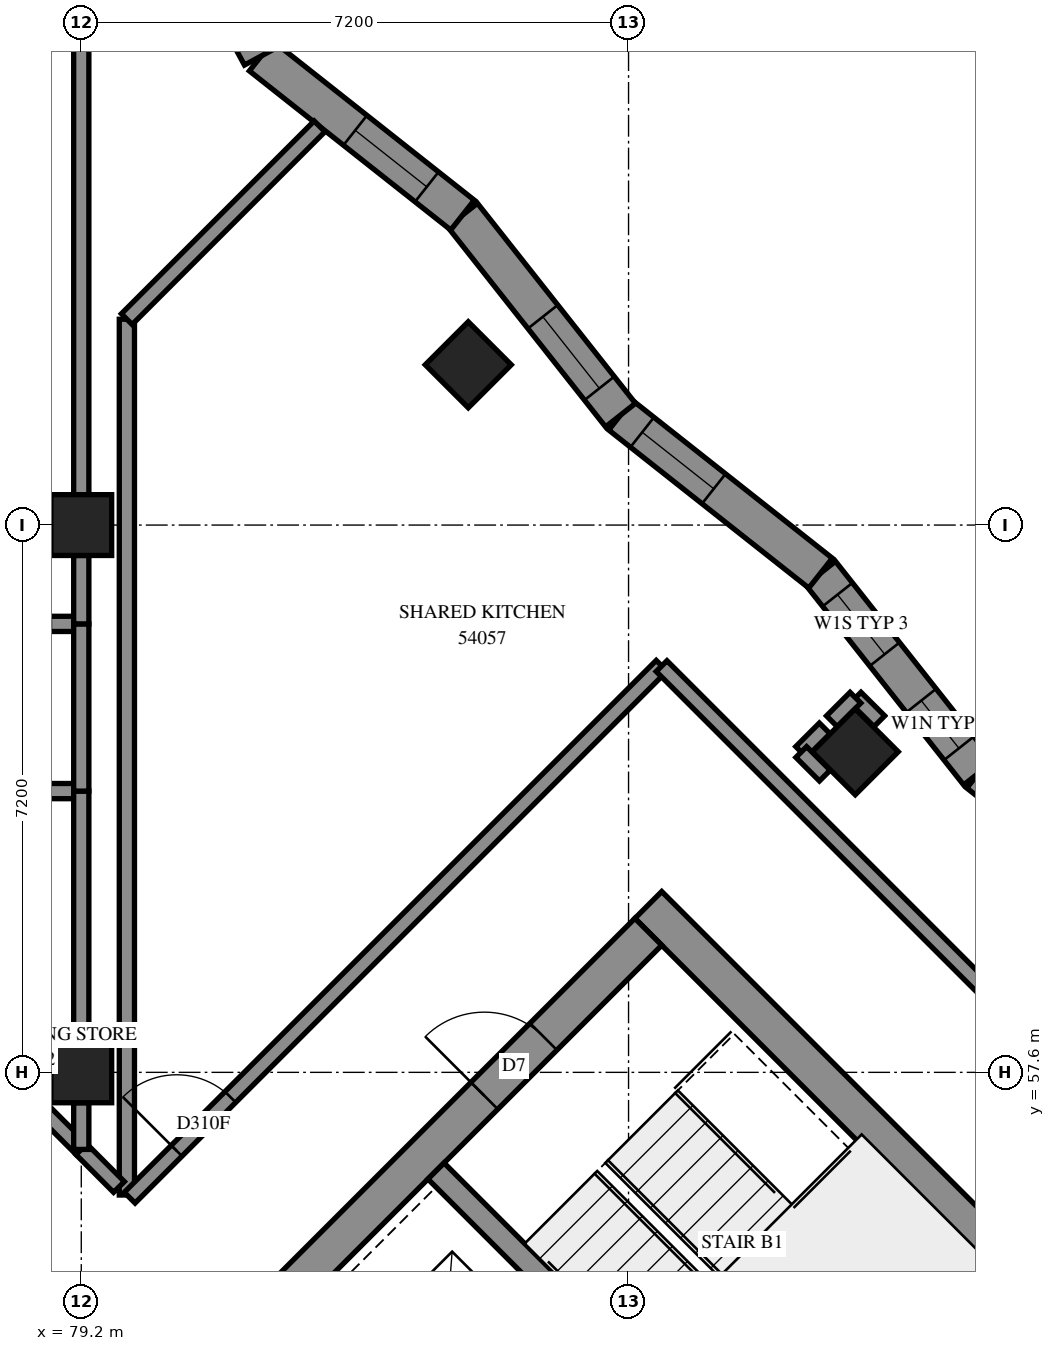
"""IFC4 building model, lengths in metres.
Left out: names, types, materials, properties, quantities, classifications, styles, units other than length and angle.
Written with IfcOpenShell. Run it as: python <this file> out.ifc"""

import sys

from ifc_helpers import new_model, si_unit, direction, frame, frame_2d, origin, origin_2d, place, context, subcontext, project, spatial, polyline, rectangle, outline, extrude, element, fill, save


model = new_model("IFC4")
c1 = context("Model", 3, precision=1e-05, world=origin(), true_north=direction((0.0, 1.0)))
c2 = subcontext(c1, "Body", "Model", "MODEL_VIEW")
j1 = project(units=[si_unit("LENGTHUNIT", "METRE"), si_unit("PLANEANGLEUNIT", "RADIAN")], contexts=[c1])
p1 = place(None, origin())
s1 = spatial("IfcSite", under=j1, at=p1, CompositionType="ELEMENT")
p2 = place(p1, origin())
s2 = spatial("IfcBuilding", under=s1, at=p2, CompositionType="ELEMENT")
p3 = place(p2, frame((0.0, 0.0, 199.8)))
s3 = spatial("IfcBuildingStorey", under=s2, at=p3, CompositionType="ELEMENT", Elevation=199.8)
for number, where, z_axis, x_axis in (
    (1, (79.2, 57.6, 0.0), (0.0, 0.0, 1.0), (1.0, 0.0, 0.0)),
    (2, (79.2, 64.8, 0.0), (0.0, 0.0, 1.0), (1.0, 0.0, 0.0)),
    (3, (84.291, 66.909, 0.0), (0.0, 0.0, 1.0), (0.707, -0.707, 0.0)),
    (4, (89.382, 61.818, 0.0), (0.0, 0.0, 1.0), (0.707, -0.707, 0.0)),
):
    element("IfcColumn", number, at=place(p3, frame(where, z_axis=z_axis, x_axis=x_axis)), inside=s3, PredefinedType="COLUMN", context=c2, shape_type="SweptSolid", body=[
        extrude(rectangle(XDim=0.8, YDim=0.8, at=origin_2d()), origin(), (0.0, 0.0, 1.0), 3.1),
    ])
p4 = place(p3, frame((86.66, 59.802, -0.3), z_axis=(0.0, 0.0, 1.0), x_axis=(0.7071067812, -0.7071067812, 0.0)))
e5 = element("IfcWall", 5, at=p4, inside=s3, PredefinedType="SHEAR", context=c2, shape_type="SweptSolid", body=[
    extrude(rectangle(XDim=15.4, YDim=0.5, at=frame_2d((7.7, 0.0))), origin(), (0.0, 0.0, 1.0), 2.7),
])
p5 = place(p4, frame((10.5, 0.0, 0.3)))
e6 = element("IfcOpeningElement", 6, at=p5, cuts=e5, PredefinedType="OPENING", context=c2, shape_type="SweptSolid", body=[
    extrude(rectangle(XDim=0.8, YDim=2.1, at=frame_2d((0.4, 1.05))), frame((0.0, 0.26, 0.0), z_axis=(0.0, -1.0, 0.0), x_axis=(1.0, 0.0, 0.0)), (0.0, 0.0, 1.0), 0.52),
])
p6 = place(p3, frame((76.478, 49.267, -0.3), z_axis=(0.0, 0.0, 1.0), x_axis=(0.7071067812, 0.7071067812, 0.0)))
e7 = element("IfcWall", 7, at=p6, inside=s3, PredefinedType="SHEAR", context=c2, shape_type="SweptSolid", body=[
    extrude(rectangle(XDim=14.4, YDim=0.5, at=frame_2d((7.2, 0.0))), origin(), (0.0, 0.0, 1.0), 2.7),
])
p7 = place(p6, frame((4.55, 0.0, 0.3)))
e8 = element("IfcOpeningElement", 8, at=p7, cuts=e7, PredefinedType="OPENING", context=c2, shape_type="SweptSolid", body=[
    extrude(rectangle(XDim=1.1, YDim=2.1, at=frame_2d((0.55, 1.05))), frame((0.0, 0.26, 0.0), z_axis=(0.0, -1.0, 0.0), x_axis=(1.0, 0.0, 0.0)), (0.0, 0.0, 1.0), 0.52),
])
p8 = place(p6, frame((11.35, 0.0, 0.3)))
e9 = element("IfcOpeningElement", 9, at=p8, cuts=e7, PredefinedType="OPENING", context=c2, shape_type="SweptSolid", body=[
    extrude(rectangle(XDim=1.1, YDim=2.1, at=frame_2d((0.55, 1.05))), frame((0.0, 0.26, 0.0), z_axis=(0.0, -1.0, 0.0), x_axis=(1.0, 0.0, 0.0)), (0.0, 0.0, 1.0), 0.52),
])
p9 = place(p3, frame((83.867, 56.302, 0.0), z_axis=(0.0, 0.0, 1.0), x_axis=(0.7071137256, -0.7070998367, 0.0)))
e10 = element("IfcWall", 10, at=p9, inside=s3, PredefinedType="SOLIDWALL", context=c2, shape_type="SweptSolid", body=[
    extrude(rectangle(XDim=7.2, YDim=0.3, at=frame_2d((3.6, 0.0))), origin(), (0.0, 0.0, 1.0), 3.1),
])
p10 = place(p3, frame((93.636, 59.458, 0.0), z_axis=(0.0, 0.0, 1.0), x_axis=(-0.7847316147, 0.6198356984, 0.0)))
e11 = element("IfcWall", 11, at=p10, inside=s3, PredefinedType="SOLIDWALL", context=c2, shape_type="SweptSolid", body=[
    extrude(outline(polyline([(-0.029, -0.25), (3.324, -0.25), (3.383, 0.25), (0.029, 0.25), (-0.029, -0.25)])), origin(), (0.0, 0.0, 1.0), 3.1),
])
p11 = place(p10, frame((1.519, 0.0, 0.45)))
e12 = element("IfcOpeningElement", 12, at=p11, cuts=e11, PredefinedType="OPENING", context=c2, shape_type="SweptSolid", body=[
    extrude(rectangle(XDim=1.2, YDim=2.5, at=frame_2d((0.6, 1.25))), frame((0.0, 0.26, 0.0), z_axis=(0.0, -1.0, 0.0), x_axis=(1.0, 0.0, 0.0)), (0.0, 0.0, 1.0), 0.52),
])
p12 = place(p3, frame((91.005, 61.536, 0.0), z_axis=(0.0, 0.0, 1.0), x_axis=(-0.6198356984, 0.7847316147, 0.0)))
e13 = element("IfcWall", 13, at=p12, inside=s3, PredefinedType="SOLIDWALL", context=c2, shape_type="SweptSolid", body=[
    extrude(outline(polyline([(0.029, -0.25), (3.383, -0.25), (3.324, 0.25), (-0.029, 0.25), (0.029, -0.25)])), origin(), (0.0, 0.0, 1.0), 3.1),
])
p13 = place(p12, frame((0.416, 0.0, 0.45)))
e14 = element("IfcOpeningElement", 14, at=p13, cuts=e13, PredefinedType="OPENING", context=c2, shape_type="SweptSolid", body=[
    extrude(rectangle(XDim=0.8, YDim=2.5, at=frame_2d((0.4, 1.25))), frame((0.0, 0.26, 0.0), z_axis=(0.0, -1.0, 0.0), x_axis=(1.0, 0.0, 0.0)), (0.0, 0.0, 1.0), 0.52),
])
p14 = place(p12, frame((1.993, 0.0, 0.45)))
e15 = element("IfcOpeningElement", 15, at=p14, cuts=e13, PredefinedType="OPENING", context=c2, shape_type="SweptSolid", body=[
    extrude(rectangle(XDim=1.0, YDim=2.5, at=frame_2d((0.5, 1.25))), frame((0.0, 0.26, 0.0), z_axis=(0.0, -1.0, 0.0), x_axis=(1.0, 0.0, 0.0)), (0.0, 0.0, 1.0), 0.52),
])
p15 = place(p3, frame((88.926, 64.168, 0.0), z_axis=(0.0, 0.0, 1.0), x_axis=(-0.7847316147, 0.6198356984, 0.0)))
e16 = element("IfcWall", 16, at=p15, inside=s3, PredefinedType="SOLIDWALL", context=c2, shape_type="SweptSolid", body=[
    extrude(outline(polyline([(-0.029, -0.25), (3.324, -0.25), (3.383, 0.25), (0.029, 0.25), (-0.029, -0.25)])), origin(), (0.0, 0.0, 1.0), 3.1),
])
p16 = place(p15, frame((1.79, 0.0, 0.45)))
e17 = element("IfcOpeningElement", 17, at=p16, cuts=e16, PredefinedType="OPENING", context=c2, shape_type="SweptSolid", body=[
    extrude(rectangle(XDim=1.2, YDim=2.5, at=frame_2d((0.6, 1.25))), frame((0.0, 0.26, 0.0), z_axis=(0.0, -1.0, 0.0), x_axis=(1.0, 0.0, 0.0)), (0.0, 0.0, 1.0), 0.52),
])
p17 = place(p3, frame((86.294, 66.247, 0.0), z_axis=(0.0, 0.0, 1.0), x_axis=(-0.6198356984, 0.7847316147, 0.0)))
e18 = element("IfcWall", 18, at=p17, inside=s3, PredefinedType="SOLIDWALL", context=c2, shape_type="SweptSolid", body=[
    extrude(outline(polyline([(0.029, -0.25), (3.383, -0.25), (3.324, 0.25), (-0.029, 0.25), (0.029, -0.25)])), origin(), (0.0, 0.0, 1.0), 3.1),
])
p18 = place(p17, frame((0.449, 0.0, 0.45)))
e19 = element("IfcOpeningElement", 19, at=p18, cuts=e18, PredefinedType="OPENING", context=c2, shape_type="SweptSolid", body=[
    extrude(rectangle(XDim=1.2, YDim=2.5, at=frame_2d((0.6, 1.25))), frame((0.0, 0.26, 0.0), z_axis=(0.0, -1.0, 0.0), x_axis=(1.0, 0.0, 0.0)), (0.0, 0.0, 1.0), 0.52),
])
p19 = place(p3, frame((84.216, 68.878, 0.0), z_axis=(0.0, 0.0, 1.0), x_axis=(-0.7847265348, 0.6198421296, 0.0)))
e20 = element("IfcWall", 20, at=p19, inside=s3, PredefinedType="SOLIDWALL", context=c2, shape_type="SweptSolid", body=[
    extrude(outline(polyline([(-0.029, -0.25), (3.324, -0.25), (3.427, 0.25), (0.029, 0.25), (-0.029, -0.25)])), origin(), (0.0, 0.0, 1.0), 3.1),
])
p20 = place(p19, frame((0.599, 0.0, 0.45)))
e21 = element("IfcOpeningElement", 21, at=p20, cuts=e20, PredefinedType="OPENING", context=c2, shape_type="SweptSolid", body=[
    extrude(rectangle(XDim=1.2, YDim=2.5, at=frame_2d((0.6, 1.25))), frame((0.0, 0.26, 0.0), z_axis=(0.0, -1.0, 0.0), x_axis=(1.0, 0.0, 0.0)), (0.0, 0.0, 1.0), 0.52),
])
p21 = place(p3, frame((81.567, 70.971, 0.0), z_axis=(0.0, 0.0, 1.0), x_axis=(-0.476089682, 0.8793967334, 0.0)))
e22 = element("IfcWall", 22, at=p21, inside=s3, PredefinedType="SOLIDWALL", context=c2, shape_type="SweptSolid", body=[
    extrude(outline(polyline([(0.051, -0.25), (3.526, -0.25), (3.134, 0.25), (-0.051, 0.25), (0.051, -0.25)])), origin(), (0.0, 0.0, 1.0), 3.1),
])
p22 = place(p21, frame((0.753, 0.0, 0.45)))
e23 = element("IfcOpeningElement", 23, at=p22, cuts=e22, PredefinedType="OPENING", context=c2, shape_type="SweptSolid", body=[
    extrude(rectangle(XDim=1.2, YDim=2.5, at=frame_2d((0.6, 1.25))), frame((0.0, 0.26, 0.0), z_axis=(0.0, -1.0, 0.0), x_axis=(1.0, 0.0, 0.0)), (0.0, 0.0, 1.0), 0.52),
])
p23 = place(p3, frame((79.8, 55.986, 0.0), z_axis=(0.0, 0.0, 1.0), x_axis=(0.0, 1.0, 0.0)))
e24 = element("IfcWall", 24, at=p23, inside=s3, PredefinedType="PARTITIONING", context=c2, shape_type="SweptSolid", body=[
    extrude(rectangle(XDim=11.522, YDim=0.2, at=frame_2d((5.761, 0.0))), origin(), (0.0, 0.0, 1.0), 3.1),
])
p24 = place(p3, frame((79.837, 55.951, 0.0), z_axis=(0.0, 0.0, 1.0), x_axis=(0.7071067812, 0.7071067812, 0.0)))
e25 = element("IfcWall", 25, at=p24, inside=s3, PredefinedType="PARTITIONING", context=c2, shape_type="SweptSolid", body=[
    extrude(rectangle(XDim=9.897, YDim=0.2, at=frame_2d((4.948, 0.0))), origin(), (0.0, 0.0, 1.0), 3.1),
])
p25 = place(p24, frame((0.873, 0.0, 0.0)))
e26 = element("IfcOpeningElement", 26, at=p25, cuts=e25, PredefinedType="OPENING", context=c2, shape_type="SweptSolid", body=[
    extrude(rectangle(XDim=1.0, YDim=2.1, at=frame_2d((0.5, 1.05))), frame((0.0, 0.11, 0.0), z_axis=(0.0, -1.0, 0.0), x_axis=(1.0, 0.0, 0.0)), (0.0, 0.0, 1.0), 0.22),
])
p26 = place(p3, frame((86.835, 62.945, 0.0), z_axis=(0.0, 0.0, 1.0), x_axis=(0.7071067812, -0.7071067812, 0.0)))
e27 = element("IfcWall", 27, at=p26, inside=s3, PredefinedType="PARTITIONING", context=c2, shape_type="SweptSolid", body=[
    extrude(rectangle(XDim=9.798, YDim=0.2, at=frame_2d((4.899, 0.0))), origin(), (0.0, 0.0, 1.0), 3.1),
])
p27 = place(p3, frame((74.489, 61.303, 0.0), z_axis=(0.0, 0.0, 1.0), x_axis=(0.7071892763, -0.7070242765, 0.0)))
e28 = element("IfcWall", 28, at=p27, inside=s3, PredefinedType="PARTITIONING", context=c2, shape_type="SweptSolid", body=[
    extrude(rectangle(XDim=6.667, YDim=0.2, at=frame_2d((3.333, 0.0))), origin(), (0.0, 0.0, 1.0), 3.1),
])
p28 = place(p3, frame((79.2, 65.2, 0.0), z_axis=(0.0, 0.0, 1.0), x_axis=(0.0, 1.0, 0.0)))
e29 = element("IfcWall", 29, at=p28, inside=s3, PredefinedType="PARTITIONING", context=c2, shape_type="SweptSolid", body=[
    extrude(rectangle(XDim=6.4, YDim=0.2, at=frame_2d((3.2, 0.0))), origin(), (0.0, 0.0, 1.0), 3.1),
])
p29 = place(p3, frame((74.489, 61.303, 0.0), z_axis=(0.0, 0.0, 1.0), x_axis=(0.9999998105, -0.0006155543, 0.0)))
e30 = element("IfcWall", 30, at=p29, inside=s3, PredefinedType="PARTITIONING", context=c2, shape_type="SweptSolid", body=[
    extrude(rectangle(XDim=4.711, YDim=0.2, at=frame_2d((2.356, 0.0))), origin(), (0.0, 0.0, 1.0), 3.1),
])
p30 = place(p29, frame((1.037, 0.0, 0.0)))
e31 = element("IfcOpeningElement", 31, at=p30, cuts=e30, PredefinedType="OPENING", context=c2, shape_type="SweptSolid", body=[
    extrude(rectangle(XDim=1.0, YDim=2.1, at=frame_2d((0.5, 1.05))), frame((0.0, 0.11, 0.0), z_axis=(0.0, -1.0, 0.0), x_axis=(1.0, 0.0, 0.0)), (0.0, 0.0, 1.0), 0.22),
])
p31 = place(p3, frame((74.602, 63.5, 0.0), z_axis=(0.0, 0.0, 1.0), x_axis=(1.0, 0.0, 0.0)))
e32 = element("IfcWall", 32, at=p31, inside=s3, PredefinedType="PARTITIONING", context=c2, shape_type="SweptSolid", body=[
    extrude(rectangle(XDim=4.598, YDim=0.2, at=frame_2d((2.299, 0.0))), origin(), (0.0, 0.0, 1.0), 3.1),
])
p32 = place(p31, frame((3.298, 0.0, 0.0)))
e33 = element("IfcOpeningElement", 33, at=p32, cuts=e32, PredefinedType="OPENING", context=c2, shape_type="SweptSolid", body=[
    extrude(rectangle(XDim=0.9, YDim=2.1, at=frame_2d((0.45, 1.05))), frame((0.0, 0.11, 0.0), z_axis=(0.0, -1.0, 0.0), x_axis=(1.0, 0.0, 0.0)), (0.0, 0.0, 1.0), 0.22),
])
p33 = place(p3, frame((79.799, 67.509, 0.0), z_axis=(0.0, 0.0, 1.0), x_axis=(0.7070928405, 0.7071207216, 0.0)))
e34 = element("IfcWall", 34, at=p33, inside=s3, PredefinedType="PARTITIONING", context=c2, shape_type="SweptSolid", body=[
    extrude(rectangle(XDim=3.587, YDim=0.2, at=frame_2d((1.793, 0.0))), origin(), (0.0, 0.0, 1.0), 3.1),
])
p34 = place(p3, frame((79.2, 58.0, 0.0), z_axis=(0.0, 0.0, 1.0), x_axis=(0.0, 1.0, 0.0)))
e35 = element("IfcWall", 35, at=p34, inside=s3, PredefinedType="PARTITIONING", context=c2, shape_type="SweptSolid", body=[
    extrude(rectangle(XDim=3.3, YDim=0.2, at=frame_2d((1.65, 0.0))), origin(), (0.0, 0.0, 1.0), 3.1),
])
p35 = place(p3, frame((79.2, 61.3, 0.0), z_axis=(0.0, 0.0, 1.0), x_axis=(0.0, 1.0, 0.0)))
e36 = element("IfcWall", 36, at=p35, inside=s3, PredefinedType="PARTITIONING", context=c2, shape_type="SweptSolid", body=[
    extrude(rectangle(XDim=2.2, YDim=0.2, at=frame_2d((1.1, 0.0))), origin(), (0.0, 0.0, 1.0), 3.1),
])
p36 = place(p3, frame((79.2, 63.5, 0.0), z_axis=(0.0, 0.0, 1.0), x_axis=(0.0, 1.0, 0.0)))
e37 = element("IfcWall", 37, at=p36, inside=s3, PredefinedType="PARTITIONING", context=c2, shape_type="SweptSolid", body=[
    extrude(rectangle(XDim=0.9, YDim=0.2, at=frame_2d((0.45, 0.0))), origin(), (0.0, 0.0, 1.0), 3.1),
])
p37 = place(p3, frame((79.202, 56.588, 0.0), z_axis=(0.0, 0.0, 1.0), x_axis=(0.7056768426, -0.7085338339, 0.0)))
e38 = element("IfcWall", 38, at=p37, inside=s3, PredefinedType="PARTITIONING", context=c2, shape_type="SweptSolid", body=[
    extrude(rectangle(XDim=0.7, YDim=0.2, at=frame_2d((0.35, 0.0))), origin(), (0.0, 0.0, 1.0), 3.1),
])
p38 = place(p3, frame((79.2, 56.586, 0.0), z_axis=(0.0, 0.0, 1.0), x_axis=(0.0, 1.0, 0.0)))
e39 = element("IfcWall", 39, at=p38, inside=s3, PredefinedType="PARTITIONING", context=c2, shape_type="SweptSolid", body=[
    extrude(rectangle(XDim=0.614, YDim=0.2, at=frame_2d((0.307, 0.0))), origin(), (0.0, 0.0, 1.0), 3.1),
])
p39 = place(p3, frame((89.388, 62.53, 0.0), z_axis=(0.0, 0.0, 1.0), x_axis=(0.7093767693, -0.7048294823, 0.0)))
e40 = element("IfcWall", 40, at=p39, inside=s3, PredefinedType="PARTITIONING", context=c2, shape_type="SweptSolid", body=[
    extrude(rectangle(XDim=0.44, YDim=0.2, at=frame_2d((0.22, 0.0))), origin(), (0.0, 0.0, 1.0), 3.1),
])
for number, where, z_axis, x_axis in (
    (41, (88.671, 61.815, 0.0), (0.0, 0.0, 1.0), (0.707, 0.707, 0.0)),
    (42, (88.672, 61.814, 0.0), (0.0, 0.0, 1.0), (0.707, -0.707, 0.0)),
    (43, (89.075, 62.219, 0.0), (0.0, 0.0, 1.0), (0.707, 0.707, 0.0)),
):
    element("IfcWall", number, at=place(p3, frame(where, z_axis=z_axis, x_axis=x_axis)), inside=s3, PredefinedType="PARTITIONING", context=c2, shape_type="SweptSolid", body=[
        extrude(rectangle(XDim=0.438, YDim=0.2, at=frame_2d((0.219, 0.0))), origin(), (0.0, 0.0, 1.0), 3.1),
    ])
p40 = place(p16, origin())
e44 = element("IfcWindow", 44, at=p40, inside=s3, PartitioningType="SINGLE_PANEL", PredefinedType="WINDOW", context=c2, shape_type="SweptSolid", body=[
    extrude(rectangle(XDim=1.2, YDim=2.5, at=frame_2d((0.6, 1.25))), frame((0.0, 0.18, 0.0), z_axis=(0.0, -1.0, 0.0), x_axis=(1.0, 0.0, 0.0)), (0.0, 0.0, 1.0), 0.06),
])
fill(e17, e44)
p41 = place(p18, origin())
e45 = element("IfcWindow", 45, at=p41, inside=s3, PartitioningType="SINGLE_PANEL", PredefinedType="WINDOW", context=c2, shape_type="SweptSolid", body=[
    extrude(rectangle(XDim=1.2, YDim=2.5, at=frame_2d((0.6, 1.25))), frame((0.0, 0.18, 0.0), z_axis=(0.0, -1.0, 0.0), x_axis=(1.0, 0.0, 0.0)), (0.0, 0.0, 1.0), 0.06),
])
fill(e19, e45)
p42 = place(p20, origin())
e46 = element("IfcWindow", 46, at=p42, inside=s3, PartitioningType="SINGLE_PANEL", PredefinedType="WINDOW", context=c2, shape_type="SweptSolid", body=[
    extrude(rectangle(XDim=1.2, YDim=2.5, at=frame_2d((0.6, 1.25))), frame((0.0, 0.18, 0.0), z_axis=(0.0, -1.0, 0.0), x_axis=(1.0, 0.0, 0.0)), (0.0, 0.0, 1.0), 0.06),
])
fill(e21, e46)
p43 = place(p8, origin())
e47 = element("IfcDoor", 47, at=p43, inside=s3, OperationType="SINGLE_SWING_LEFT", PredefinedType="DOOR", context=c2, shape_type="SweptSolid", body=[
    extrude(rectangle(XDim=1.1, YDim=2.1, at=frame_2d((0.55, 1.05))), frame((0.0, 0.025, 0.0), z_axis=(0.0, -1.0, 0.0), x_axis=(1.0, 0.0, 0.0)), (0.0, 0.0, 1.0), 0.05),
])
fill(e9, e47)
p44 = place(p25, origin())
e48 = element("IfcDoor", 48, at=p44, inside=s3, OperationType="SINGLE_SWING_RIGHT", PredefinedType="DOOR", context=c2, shape_type="SweptSolid", body=[
    extrude(rectangle(XDim=1.0, YDim=2.1, at=frame_2d((0.5, 1.05))), frame((0.0, 0.025, 0.0), z_axis=(0.0, -1.0, 0.0), x_axis=(1.0, 0.0, 0.0)), (0.0, 0.0, 1.0), 0.05),
])
fill(e26, e48)
p45 = place(p13, origin())
e49 = element("IfcWindow", 49, at=p45, inside=s3, PartitioningType="SINGLE_PANEL", PredefinedType="WINDOW", context=c2, shape_type="SweptSolid", body=[
    extrude(rectangle(XDim=0.8, YDim=2.5, at=frame_2d((0.4, 1.25))), frame((0.0, 0.18, 0.0), z_axis=(0.0, -1.0, 0.0), x_axis=(1.0, 0.0, 0.0)), (0.0, 0.0, 1.0), 0.06),
])
fill(e14, e49)
p46 = place(p14, origin())
e50 = element("IfcWindow", 50, at=p46, inside=s3, PartitioningType="SINGLE_PANEL", PredefinedType="WINDOW", context=c2, shape_type="SweptSolid", body=[
    extrude(rectangle(XDim=1.0, YDim=2.5, at=frame_2d((0.5, 1.25))), frame((0.0, 0.18, 0.0), z_axis=(0.0, -1.0, 0.0), x_axis=(1.0, 0.0, 0.0)), (0.0, 0.0, 1.0), 0.06),
])
fill(e15, e50)
save(model, sys.argv[1])
